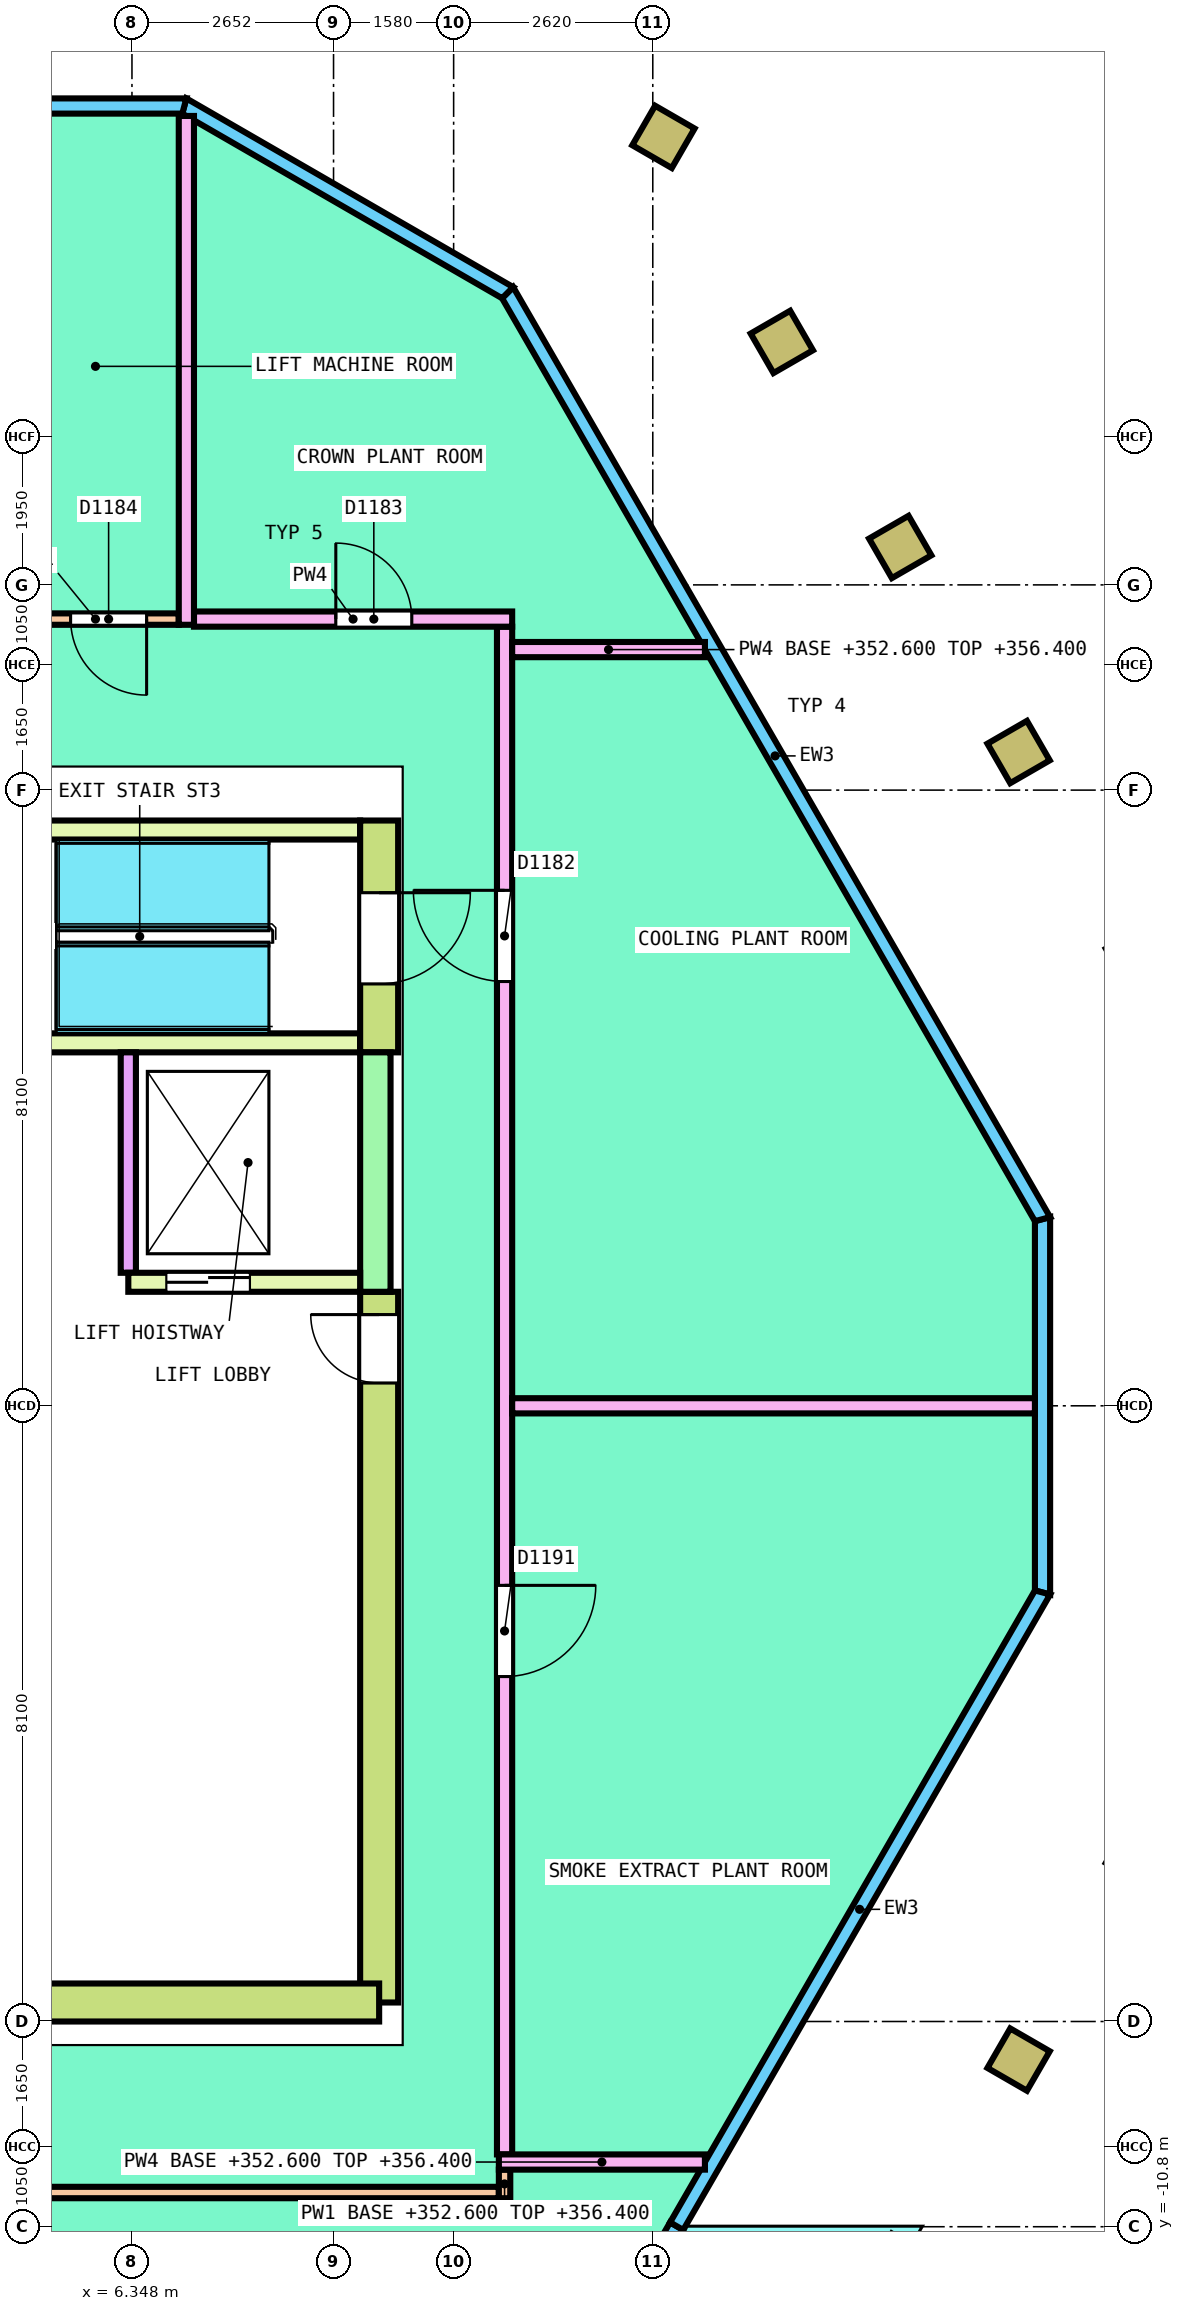
"""IFC4 building model, lengths in metres.
Left out: names, types, materials, properties, quantities, classifications, styles, units other than length and angle.
Written with IfcOpenShell. Run it as: python <this file> out.ifc"""

import sys

from ifc_helpers import new_model, si_unit, direction, frame, frame_2d, origin, origin_2d, place, context, subcontext, project, spatial, polyline, rectangle, hollow_rectangle, outline, extrude, element, fill, save


model = new_model("IFC4")
c1 = context("Model", 3, precision=1e-05, world=origin(), true_north=direction((0.0, 1.0)))
c2 = subcontext(c1, "Body", "Model", "MODEL_VIEW")
j1 = project(units=[si_unit("LENGTHUNIT", "METRE"), si_unit("PLANEANGLEUNIT", "RADIAN")], contexts=[c1])
p1 = place(None, origin())
s1 = spatial("IfcSite", under=j1, at=p1, CompositionType="ELEMENT")
p2 = place(p1, origin())
s2 = spatial("IfcBuilding", under=s1, at=p2, CompositionType="ELEMENT")
p3 = place(p2, frame((0.0, 0.0, 352.6)))
s3 = spatial("IfcBuildingStorey", under=s2, at=p3, CompositionType="ELEMENT", Elevation=352.6)
for number, where, z_axis, x_axis in (
    (1, (18.013, 8.601, 0.0), (0.0, 0.0, 1.0), (-0.5, 0.866, 0.0)),
    (2, (16.455, 11.299, 0.0), (0.0, 0.0, 1.0), (-0.5, 0.866, 0.0)),
    (3, (14.898, 13.996, 0.0), (0.0, 0.0, 1.0), (-0.5, 0.866, 0.0)),
    (4, (13.34, 16.694, 0.0), (0.0, 0.0, 1.0), (-0.866, 0.5, 0.0)),
    (5, (18.013, -8.601, 0.0), (0.0, 0.0, 1.0), (0.5, 0.866, 0.0)),
):
    element("IfcColumn", number, at=place(p3, frame(where, z_axis=z_axis, x_axis=x_axis)), inside=s3, PredefinedType="COLUMN", context=c2, shape_type="SweptSolid", body=[
        extrude(hollow_rectangle(XDim=0.6, YDim=0.6, WallThickness=0.04, InnerFilletRadius=0.04, OuterFilletRadius=0.08, at=origin_2d()), origin(), (0.0, 0.0, 1.0), 4.0),
    ])
p4 = place(p3, frame((18.327, -2.456, 0.0), z_axis=(0.0, 0.0, 1.0), x_axis=(0.0, 1.0, 0.0)))
e6 = element("IfcWall", 6, at=p4, inside=s3, PredefinedType="SOLIDWALL", context=c2, shape_type="SweptSolid", body=[
    extrude(outline(polyline([(-0.027, -0.1), (4.938, -0.1), (4.885, 0.1), (0.027, 0.1), (-0.027, -0.1)])), origin(), (0.0, 0.0, 1.0), 3.8),
])
p5 = place(p3, frame((18.327, 2.456, 0.0), z_axis=(0.0, 0.0, 1.0), x_axis=(-0.499991740577, 0.866030172312, 0.0)))
e7 = element("IfcWall", 7, at=p5, inside=s3, PredefinedType="SOLIDWALL", context=c2, shape_type="SweptSolid", body=[
    extrude(outline(polyline([(-0.027, -0.1), (14.101, -0.1), (14.047, 0.1), (0.027, 0.1), (-0.027, -0.1)])), origin(), (0.0, 0.0, 1.0), 3.8),
])
p6 = place(p3, frame((11.291, 14.644, 0.0), z_axis=(0.0, 0.0, 1.0), x_axis=(-0.86601671623, 0.500015046984, 0.0)))
e8 = element("IfcWall", 8, at=p6, inside=s3, PredefinedType="SOLIDWALL", context=c2, shape_type="SweptSolid", body=[
    extrude(outline(polyline([(-0.027, -0.1), (4.938, -0.1), (4.885, 0.1), (0.027, 0.1), (-0.027, -0.1)])), origin(), (0.0, 0.0, 1.0), 3.8),
])
p7 = place(p3, frame((7.037, 17.1, 0.0), z_axis=(0.0, 0.0, 1.0), x_axis=(-1.0, 0.0, 0.0)))
e9 = element("IfcWall", 9, at=p7, inside=s3, PredefinedType="SOLIDWALL", context=c2, shape_type="SweptSolid", body=[
    extrude(outline(polyline([(-0.027, -0.1), (14.101, -0.1), (14.047, 0.1), (0.027, 0.1), (-0.027, -0.1)])), origin(), (0.0, 0.0, 1.0), 3.8),
])
p8 = place(p3, frame((12.071, -13.292, 0.0), z_axis=(0.0, 0.0, 1.0), x_axis=(0.500005579313, 0.866022182542, 0.0)))
e10 = element("IfcWall", 10, at=p8, inside=s3, PredefinedType="SOLIDWALL", context=c2, shape_type="SweptSolid", body=[
    extrude(outline(polyline([(0.0, 0.0), (2.886, 0.0), (2.886, 4.0), (0.0, 0.03), (0.0, 0.0)])), frame((0.0, 0.1, 0.0), z_axis=(0.0, -1.0, 0.0), x_axis=(1.0, 0.0, 0.0)), (0.0, 0.0, 1.0), 0.2),
])
p9 = place(p3, frame((13.514, -10.793, 0.0), z_axis=(0.0, 0.0, 1.0), x_axis=(0.499993209709, 0.866029324125, 0.0)))
e11 = element("IfcWall", 11, at=p9, inside=s3, PredefinedType="SOLIDWALL", context=c2, shape_type="SweptSolid", body=[
    extrude(outline(polyline([(0.0, -0.1), (9.654, -0.1), (9.6, 0.1), (0.0, 0.1), (0.0, -0.1)])), origin(), (0.0, 0.0, 1.0), 3.8),
])
p10 = place(p3, frame((9.6, -7.85, 0.0), z_axis=(0.0, 0.0, 1.0), x_axis=(0.0, 1.0, 0.0)))
e12 = element("IfcWall", 12, at=p10, inside=s3, PredefinedType="SHEAR", context=c2, shape_type="SweptSolid", body=[
    extrude(rectangle(XDim=9.35, YDim=0.5, at=frame_2d((4.675, 0.0))), origin(), (0.0, 0.0, 1.0), 3.8),
])
p11 = place(p10, frame((8.15, 0.0, 0.0)))
e13 = element("IfcOpeningElement", 13, at=p11, cuts=e12, PredefinedType="OPENING", context=c2, shape_type="SweptSolid", body=[
    extrude(rectangle(XDim=0.9, YDim=2.1, at=frame_2d((0.45, 1.05))), frame((0.0, 0.26, 0.0), z_axis=(0.0, -1.0, 0.0), x_axis=(1.0, 0.0, 0.0)), (0.0, 0.0, 1.0), 0.52),
])
p12 = place(p3, frame((-3.3, -7.85, 0.0), z_axis=(0.0, 0.0, 1.0), x_axis=(1.0, 0.0, 0.0)))
e14 = element("IfcWall", 14, at=p12, inside=s3, PredefinedType="SHEAR", context=c2, shape_type="SweptSolid", body=[
    extrude(rectangle(XDim=12.9, YDim=0.5, at=frame_2d((6.45, 0.0))), origin(), (0.0, 0.0, 1.0), 3.8),
])
p13 = place(p12, frame((5.8, 0.0, 0.0)))
e15 = element("IfcOpeningElement", 15, at=p13, cuts=e14, PredefinedType="OPENING", context=c2, shape_type="SweptSolid", body=[
    extrude(rectangle(XDim=1.2, YDim=2.1, at=frame_2d((0.6, 1.05))), frame((0.0, 0.26, 0.0), z_axis=(0.0, -1.0, 0.0), x_axis=(1.0, 0.0, 0.0)), (0.0, 0.0, 1.0), 0.52),
])
p14 = place(p3, frame((9.6, 4.65, 0.0), z_axis=(0.0, 0.0, 1.0), x_axis=(0.0, 1.0, 0.0)))
e16 = element("IfcWall", 16, at=p14, inside=s3, PredefinedType="SHEAR", context=c2, shape_type="SweptSolid", body=[
    extrude(rectangle(XDim=3.05, YDim=0.5, at=frame_2d((1.525, 0.0))), origin(), (0.0, 0.0, 1.0), 3.8),
])
p15 = place(p14, frame((0.9, 0.0, 0.0)))
e17 = element("IfcOpeningElement", 17, at=p15, cuts=e16, PredefinedType="OPENING", context=c2, shape_type="SweptSolid", body=[
    extrude(rectangle(XDim=1.2, YDim=2.1, at=frame_2d((0.6, 1.05))), frame((0.0, 0.26, 0.0), z_axis=(0.0, -1.0, 0.0), x_axis=(1.0, 0.0, 0.0)), (0.0, 0.0, 1.0), 0.52),
])
for number, where, z_axis, x_axis in (
    (18, (3.3, 4.775, 0.0), (0.0, 0.0, 1.0), (1.0, 0.0, 0.0)),
    (19, (3.3, 7.575, 0.0), (0.0, 0.0, 1.0), (1.0, 0.0, 0.0)),
):
    element("IfcWall", number, at=place(p3, frame(where, z_axis=z_axis, x_axis=x_axis)), inside=s3, PredefinedType="SOLIDWALL", context=c2, shape_type="SweptSolid", body=[
        extrude(rectangle(XDim=6.05, YDim=0.25, at=frame_2d((3.025, 0.0))), origin(), (0.0, 0.0, 1.0), 3.8),
    ])
p16 = place(p3, frame((6.3, 1.625, 0.0), z_axis=(0.0, 0.0, 1.0), x_axis=(1.0, 0.0, 0.0)))
e20 = element("IfcWall", 20, at=p16, inside=s3, PredefinedType="SOLIDWALL", context=c2, shape_type="SweptSolid", body=[
    extrude(rectangle(XDim=3.05, YDim=0.25, at=frame_2d((1.525, 0.0))), origin(), (0.0, 0.0, 1.0), 3.8),
])
p17 = place(p16, frame((0.5, 0.0, 0.0)))
e21 = element("IfcOpeningElement", 21, at=p17, cuts=e20, PredefinedType="OPENING", context=c2, shape_type="SweptSolid", body=[
    extrude(rectangle(XDim=1.1, YDim=2.1, at=frame_2d((0.55, 1.05))), frame((0.0, 0.135, 0.0), z_axis=(0.0, -1.0, 0.0), x_axis=(1.0, 0.0, 0.0)), (0.0, 0.0, 1.0), 0.27),
])
p18 = place(p3, frame((6.3, 1.75, 0.0), z_axis=(0.0, 0.0, 1.0), x_axis=(0.0, 1.0, 0.0)))
e22 = element("IfcWall", 22, at=p18, inside=s3, PredefinedType="SOLIDWALL", context=c2, shape_type="SweptSolid", body=[
    extrude(rectangle(XDim=2.9, YDim=0.2, at=frame_2d((1.45, 0.0))), origin(), (0.0, 0.0, 1.0), 3.8),
])
p19 = place(p3, frame((9.55, 1.5, 0.0), z_axis=(0.0, 0.0, 1.0), x_axis=(0.0, 1.0, 0.0)))
e23 = element("IfcWall", 23, at=p19, inside=s3, PredefinedType="SHEAR", context=c2, shape_type="SweptSolid", body=[
    extrude(rectangle(XDim=3.15, YDim=0.4, at=frame_2d((1.575, 0.0))), origin(), (0.0, 0.0, 1.0), 3.8),
])
p20 = place(p3, frame((4.772, 10.35, 0.0), z_axis=(0.0, 0.0, 1.0), x_axis=(1.0, 0.0, 0.0)))
e24 = element("IfcWall", 24, at=p20, inside=s3, PredefinedType="PARTITIONING", context=c2, shape_type="SweptSolid", body=[
    extrude(rectangle(XDim=2.192, YDim=0.15, at=frame_2d((1.096, 0.0))), origin(), (0.0, 0.0, 1.0), 3.3),
])
p21 = place(p20, frame((0.769, 0.0, 0.0)))
e25 = element("IfcOpeningElement", 25, at=p21, cuts=e24, PredefinedType="OPENING", context=c2, shape_type="SweptSolid", body=[
    extrude(rectangle(XDim=1.0, YDim=2.1, at=frame_2d((0.5, 1.05))), frame((0.0, 0.085, 0.0), z_axis=(0.0, -1.0, 0.0), x_axis=(1.0, 0.0, 0.0)), (0.0, 0.0, 1.0), 0.17),
])
p22 = place(p3, frame((-11.325, -10.35, 0.0), z_axis=(0.0, 0.0, 1.0), x_axis=(1.0, 0.0, 0.0)))
e26 = element("IfcWall", 26, at=p22, inside=s3, PredefinedType="PARTITIONING", context=c2, shape_type="SweptSolid", body=[
    extrude(rectangle(XDim=22.5, YDim=0.15, at=frame_2d((11.25, 0.0))), origin(), (0.0, 0.0, 1.0), 3.8),
])
p23 = place(p22, frame((7.705, 0.0, 0.0)))
e27 = element("IfcOpeningElement", 27, at=p23, cuts=e26, PredefinedType="OPENING", context=c2, shape_type="SweptSolid", body=[
    extrude(rectangle(XDim=1.0, YDim=2.1, at=frame_2d((0.5, 1.05))), frame((0.0, 0.085, 0.0), z_axis=(0.0, -1.0, 0.0), x_axis=(1.0, 0.0, 0.0)), (0.0, 0.0, 1.0), 0.17),
])
p24 = place(p3, frame((11.25, -10.425, 0.0), z_axis=(0.0, 0.0, 1.0), x_axis=(0.0, 1.0, 0.0)))
e28 = element("IfcWall", 28, at=p24, inside=s3, PredefinedType="PARTITIONING", context=c2, shape_type="SweptSolid", body=[
    extrude(rectangle(XDim=0.376, YDim=0.15, at=frame_2d((0.188, 0.0))), origin(), (0.0, 0.0, 1.0), 3.8),
])
p25 = place(p3, frame((11.25, -9.849, 0.0), z_axis=(0.0, 0.0, 1.0), x_axis=(0.0, 1.0, 0.0)))
e29 = element("IfcWall", 29, at=p25, inside=s3, PredefinedType="PARTITIONING", context=c2, shape_type="SweptSolid", body=[
    extrude(rectangle(XDim=20.099, YDim=0.2, at=frame_2d((10.049, 0.0))), origin(), (0.0, 0.0, 1.0), 3.3),
])
p26 = place(p25, frame((15.43, 0.0, 0.0)))
e30 = element("IfcOpeningElement", 30, at=p26, cuts=e29, PredefinedType="OPENING", context=c2, shape_type="SweptSolid", body=[
    extrude(rectangle(XDim=1.2, YDim=2.1, at=frame_2d((0.6, 1.05))), frame((0.0, 0.11, 0.0), z_axis=(0.0, -1.0, 0.0), x_axis=(1.0, 0.0, 0.0)), (0.0, 0.0, 1.0), 0.22),
])
p27 = place(p25, frame((6.287, 0.0, 0.0)))
e31 = element("IfcOpeningElement", 31, at=p27, cuts=e29, PredefinedType="OPENING", context=c2, shape_type="SweptSolid", body=[
    extrude(rectangle(XDim=1.2, YDim=2.1, at=frame_2d((0.6, 1.05))), frame((0.0, 0.11, 0.0), z_axis=(0.0, -1.0, 0.0), x_axis=(1.0, 0.0, 0.0)), (0.0, 0.0, 1.0), 0.22),
])
p28 = place(p3, frame((7.164, 10.35, 0.0), z_axis=(0.0, 0.0, 1.0), x_axis=(1.0, 0.0, 0.0)))
e32 = element("IfcWall", 32, at=p28, inside=s3, PredefinedType="PARTITIONING", context=c2, shape_type="SweptSolid", body=[
    extrude(rectangle(XDim=4.186, YDim=0.2, at=frame_2d((2.093, 0.0))), origin(), (0.0, 0.0, 1.0), 3.3),
])
p29 = place(p28, frame((1.866, 0.0, 0.0)))
e33 = element("IfcOpeningElement", 33, at=p29, cuts=e32, PredefinedType="OPENING", context=c2, shape_type="SweptSolid", body=[
    extrude(rectangle(XDim=1.0, YDim=2.1, at=frame_2d((0.5, 1.05))), frame((0.0, 0.11, 0.0), z_axis=(0.0, -1.0, 0.0), x_axis=(1.0, 0.0, 0.0)), (0.0, 0.0, 1.0), 0.22),
])
p30 = place(p3, frame((11.35, 9.949, 0.0), z_axis=(0.0, 0.0, 1.0), x_axis=(1.0, 0.0, 0.0)))
e34 = element("IfcWall", 34, at=p30, inside=s3, PredefinedType="PARTITIONING", context=c2, shape_type="SweptSolid", body=[
    extrude(rectangle(XDim=2.536, YDim=0.2, at=frame_2d((1.268, 0.0))), origin(), (0.0, 0.0, 1.0), 3.8),
])
p31 = place(p3, frame((11.35, 0.0, 0.0), z_axis=(0.0, 0.0, 1.0), x_axis=(1.0, 0.0, 0.0)))
e35 = element("IfcWall", 35, at=p31, inside=s3, PredefinedType="PARTITIONING", context=c2, shape_type="SweptSolid", body=[
    extrude(rectangle(XDim=6.877, YDim=0.2, at=frame_2d((3.439, 0.0))), origin(), (0.0, 0.0, 1.0), 3.3),
])
p32 = place(p3, frame((7.064, 10.275, 0.0), z_axis=(0.0, 0.0, 1.0), x_axis=(0.0, 1.0, 0.0)))
e36 = element("IfcWall", 36, at=p32, inside=s3, PredefinedType="PARTITIONING", context=c2, shape_type="SweptSolid", body=[
    extrude(rectangle(XDim=6.694, YDim=0.2, at=frame_2d((3.347, 0.0))), origin(), (0.0, 0.0, 1.0), 3.3),
])
p33 = place(p3, frame((11.175, -9.949, 0.0), z_axis=(0.0, 0.0, 1.0), x_axis=(1.0, 0.0, 0.0)))
e37 = element("IfcWall", 37, at=p33, inside=s3, PredefinedType="PARTITIONING", context=c2, shape_type="SweptSolid", body=[
    extrude(rectangle(XDim=2.711, YDim=0.2, at=frame_2d((1.355, 0.0))), origin(), (0.0, 0.0, 1.0), 3.8),
])
p34 = place(p15, origin())
e38 = element("IfcDoor", 38, at=p34, inside=s3, OperationType="SINGLE_SWING_LEFT", PredefinedType="DOOR", context=c2, shape_type="SweptSolid", body=[
    extrude(rectangle(XDim=1.2, YDim=2.1, at=frame_2d((0.6, 1.05))), frame((0.0, 0.2, 0.0), z_axis=(0.0, -1.0, 0.0), x_axis=(1.0, 0.0, 0.0)), (0.0, 0.0, 1.0), 0.4),
])
fill(e17, e38)
p35 = place(p17, origin())
e39 = element("IfcDoor", 39, at=p35, inside=s3, OperationType="DOUBLE_DOOR_SLIDING", PredefinedType="DOOR", context=c2, shape_type="SweptSolid", body=[
    extrude(rectangle(XDim=1.1, YDim=2.1, at=frame_2d((0.55, 1.05))), frame((0.0, 0.075, 0.0), z_axis=(0.0, -1.0, 0.0), x_axis=(1.0, 0.0, 0.0)), (0.0, 0.0, 1.0), 0.15),
])
fill(e21, e39)
p36 = place(p11, origin())
e40 = element("IfcDoor", 40, at=p36, inside=s3, OperationType="SINGLE_SWING_LEFT", PredefinedType="DOOR", context=c2, shape_type="SweptSolid", body=[
    extrude(rectangle(XDim=0.9, YDim=2.1, at=frame_2d((0.45, 1.05))), frame((0.0, 0.2, 0.0), z_axis=(0.0, -1.0, 0.0), x_axis=(1.0, 0.0, 0.0)), (0.0, 0.0, 1.0), 0.4),
])
fill(e13, e40)
p37 = place(p26, origin())
e41 = element("IfcDoor", 41, at=p37, inside=s3, OperationType="DOUBLE_DOOR_SINGLE_SWING", PredefinedType="DOOR", context=c2, shape_type="SweptSolid", body=[
    extrude(rectangle(XDim=1.2, YDim=2.1, at=frame_2d((0.6, 1.05))), frame((0.0, 0.025, 0.0), z_axis=(0.0, -1.0, 0.0), x_axis=(1.0, 0.0, 0.0)), (0.0, 0.0, 1.0), 0.05),
])
fill(e30, e41)
p38 = place(p29, origin())
e42 = element("IfcDoor", 42, at=p38, inside=s3, OperationType="SINGLE_SWING_RIGHT", PredefinedType="DOOR", context=c2, shape_type="SweptSolid", body=[
    extrude(rectangle(XDim=1.0, YDim=2.1, at=frame_2d((0.5, 1.05))), frame((0.0, 0.025, 0.0), z_axis=(0.0, -1.0, 0.0), x_axis=(1.0, 0.0, 0.0)), (0.0, 0.0, 1.0), 0.05),
])
fill(e33, e42)
p39 = place(p21, origin())
e43 = element("IfcDoor", 43, at=p39, inside=s3, OperationType="SINGLE_SWING_RIGHT", PredefinedType="DOOR", context=c2, shape_type="SweptSolid", body=[
    extrude(rectangle(XDim=1.0, YDim=2.1, at=frame_2d((0.5, 1.05))), frame((0.0, 0.025, 0.0), z_axis=(0.0, -1.0, 0.0), x_axis=(1.0, 0.0, 0.0)), (0.0, 0.0, 1.0), 0.05),
])
fill(e25, e43)
p40 = place(p27, origin())
e44 = element("IfcDoor", 44, at=p40, inside=s3, OperationType="DOUBLE_DOOR_SINGLE_SWING", PredefinedType="DOOR", context=c2, shape_type="SweptSolid", body=[
    extrude(rectangle(XDim=1.2, YDim=2.1, at=frame_2d((0.6, 1.05))), frame((0.0, 0.025, 0.0), z_axis=(0.0, -1.0, 0.0), x_axis=(1.0, 0.0, 0.0)), (0.0, 0.0, 1.0), 0.05),
])
fill(e31, e44)
save(model, sys.argv[1])
